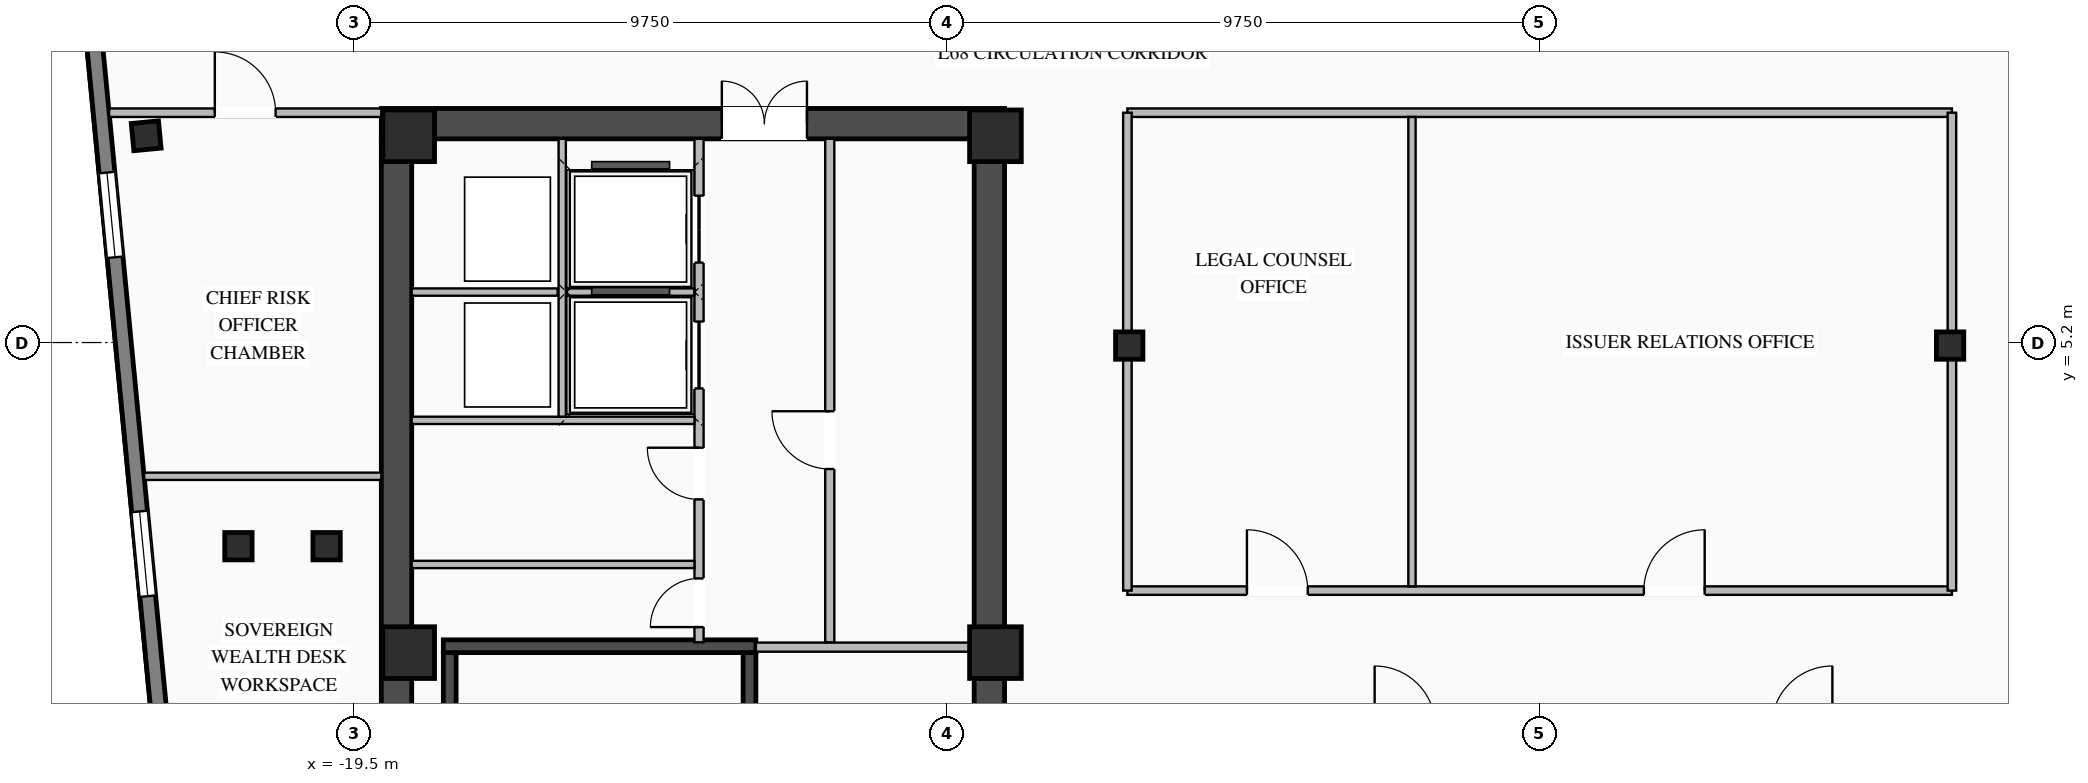
"""IFC4 building model, lengths in metres.
Left out: names, types, materials, properties, quantities, classifications, styles, units other than length and angle.
Written with IfcOpenShell. Run it as: python <this file> out.ifc"""

import sys

from ifc_helpers import new_model, si_unit, direction, frame, frame_2d, origin, origin_2d, place, context, subcontext, project, spatial, rectangle, i_section, extrude, element, fill, save


model = new_model("IFC4")
c1 = context("Model", 3, precision=1e-05, world=origin(), true_north=direction((0.0, 1.0)))
c2 = subcontext(c1, "Body", "Model", "MODEL_VIEW")
j1 = project(units=[si_unit("LENGTHUNIT", "METRE"), si_unit("PLANEANGLEUNIT", "RADIAN")], contexts=[c1])
p1 = place(None, origin())
s1 = spatial("IfcSite", under=j1, at=p1, CompositionType="ELEMENT")
p2 = place(p1, origin())
s2 = spatial("IfcBuilding", under=s1, at=p2, CompositionType="ELEMENT")
p3 = place(p2, frame((0.0, 0.0, 251.7)))
s3 = spatial("IfcBuildingStorey", under=s2, at=p3, CompositionType="ELEMENT", Elevation=251.7)
p4 = place(p3, frame((-19.05, 8.8, 0.0), z_axis=(0.0, 0.0, 1.0), x_axis=(1.0, 0.0, 0.0)))
e1 = element("IfcWall", 1, at=p4, inside=s3, PredefinedType="SHEAR", context=c2, shape_type="SweptSolid", body=[
    extrude(rectangle(XDim=10.25, YDim=0.5, at=frame_2d((5.125, 0.0))), origin(), (0.0, 0.0, 1.0), 3.27),
])
p5 = place(p4, frame((5.6, 0.0, 0.0)))
e2 = element("IfcOpeningElement", 2, at=p5, cuts=e1, PredefinedType="OPENING", context=c2, shape_type="SweptSolid", body=[
    extrude(rectangle(XDim=1.4, YDim=2.05, at=frame_2d((0.7, 1.025))), frame((0.0, 0.26, 0.0), z_axis=(0.0, -1.0, 0.0), x_axis=(1.0, 0.0, 0.0)), (0.0, 0.0, 1.0), 0.52),
])
p6 = place(p3, frame((-18.8, -8.55, 0.0), z_axis=(0.0, 0.0, 1.0), x_axis=(0.0, 1.0, 0.0)))
e3 = element("IfcWall", 3, at=p6, inside=s3, PredefinedType="SHEAR", context=c2, shape_type="SweptSolid", body=[
    extrude(rectangle(XDim=17.1, YDim=0.5, at=frame_2d((8.55, 0.0))), origin(), (0.0, 0.0, 1.0), 3.27),
])
p7 = place(p3, frame((-9.05, -8.55, 0.0), z_axis=(0.0, 0.0, 1.0), x_axis=(0.0, 1.0, 0.0)))
e4 = element("IfcWall", 4, at=p7, inside=s3, PredefinedType="SHEAR", context=c2, shape_type="SweptSolid", body=[
    extrude(rectangle(XDim=17.1, YDim=0.5, at=frame_2d((8.55, 0.0))), origin(), (0.0, 0.0, 1.0), 3.27),
])
p8 = place(p7, frame((5.3, 0.0, 0.0)))
e5 = element("IfcOpeningElement", 5, at=p8, cuts=e4, PredefinedType="OPENING", context=c2, shape_type="SweptSolid", body=[
    extrude(rectangle(XDim=1.1, YDim=2.08, at=frame_2d((0.55, 1.04))), frame((0.0, 0.26, 0.0), z_axis=(0.0, -1.0, 0.0), x_axis=(1.0, 0.0, 0.0)), (0.0, 0.0, 1.0), 0.52),
])
p9 = place(p3, frame((-12.995, -8.1, 0.0), z_axis=(0.0, 0.0, 1.0), x_axis=(0.0, 1.0, 0.0)))
e6 = element("IfcWall", 6, at=p9, inside=s3, PredefinedType="SHEAR", context=c2, shape_type="SweptSolid", body=[
    extrude(rectangle(XDim=8.2, YDim=0.21, at=frame_2d((4.1, 0.0))), origin(), (0.0, 0.0, 1.0), 3.27),
])
p10 = place(p9, frame((6.25, 0.0, 0.0)))
e7 = element("IfcOpeningElement", 7, at=p10, cuts=e6, PredefinedType="OPENING", context=c2, shape_type="SweptSolid", body=[
    extrude(rectangle(XDim=1.1, YDim=2.15, at=frame_2d((0.55, 1.075))), frame((0.0, 0.115, 0.0), z_axis=(0.0, -1.0, 0.0), x_axis=(1.0, 0.0, 0.0)), (0.0, 0.0, 1.0), 0.23),
])
p11 = place(p3, frame((-17.925, -8.1, 0.0), z_axis=(0.0, 0.0, 1.0), x_axis=(0.0, 1.0, 0.0)))
e8 = element("IfcWall", 8, at=p11, inside=s3, PredefinedType="SHEAR", context=c2, shape_type="SweptSolid", body=[
    extrude(rectangle(XDim=8.2, YDim=0.21, at=frame_2d((4.1, 0.0))), origin(), (0.0, 0.0, 1.0), 3.27),
])
p12 = place(p3, frame((-12.89, 0.205, 0.0), z_axis=(0.0, 0.0, 1.0), x_axis=(-1.0, 0.0, 0.0)))
e9 = element("IfcWall", 9, at=p12, inside=s3, PredefinedType="SHEAR", context=c2, shape_type="SweptSolid", body=[
    extrude(rectangle(XDim=5.14, YDim=0.21, at=frame_2d((2.57, 0.0))), origin(), (0.0, 0.0, 1.0), 3.27),
])
for number, where, z_axis, x_axis in (
    (10, (-8.95, 0.1, 0.0), (0.0, 0.0, 1.0), (1.0, 0.0, 0.0)),
    (11, (-8.95, 8.6, 0.0), (0.0, 0.0, 1.0), (1.0, 0.0, 0.0)),
    (12, (-18.6, 0.1, 0.0), (0.0, 0.0, 1.0), (1.0, 0.0, 0.0)),
    (13, (-18.6, 8.6, 0.0), (0.0, 0.0, 1.0), (1.0, 0.0, 0.0)),
):
    element("IfcColumn", number, at=place(p3, frame(where, z_axis=z_axis, x_axis=x_axis)), inside=s3, PredefinedType="COLUMN", context=c2, shape_type="SweptSolid", body=[
        extrude(rectangle(XDim=0.85, YDim=0.85, at=origin_2d()), origin(), (0.0, 0.0, 1.0), 3.45),
    ])
for number, where, z_axis, x_axis in (
    (14, (-6.75, 5.15, 0.0), (0.0, 0.0, 1.0), (1.0, 0.0, 0.0)),
    (15, (6.75, 5.15, 0.0), (0.0, 0.0, 1.0), (1.0, 0.0, 0.0)),
    (16, (-21.4, 1.85, 0.0), (0.0, 0.0, 1.0), (1.0, 0.0, 0.0)),
    (17, (-19.95, 1.85, 0.0), (0.0, 0.0, 1.0), (1.0, 0.0, 0.0)),
    (18, (-22.917, 8.6, 0.0), (0.0, 0.0, 1.0), (0.995, 0.096, 0.0)),
):
    element("IfcColumn", number, at=place(p3, frame(where, z_axis=z_axis, x_axis=x_axis)), inside=s3, PredefinedType="COLUMN", context=c2, shape_type="SweptSolid", body=[
        extrude(i_section(OverallWidth=0.45, OverallDepth=0.45, WebThickness=0.022, FlangeThickness=0.032, at=origin_2d()), origin(), (0.0, 0.0, 1.0), 3.45),
    ])
p13 = place(p3, frame((-22.527, -2.754, 0.0), z_axis=(0.0, 0.0, 1.0), x_axis=(-0.095850890337, 0.995395703638, 0.0)))
e19 = element("IfcWall", 19, at=p13, inside=s3, PredefinedType="STANDARD", context=c2, shape_type="SweptSolid", body=[
    extrude(rectangle(XDim=15.15, YDim=0.26, at=frame_2d((7.575, 0.0))), origin(), (0.0, 0.0, 1.0), 3.25),
])
p14 = place(p13, frame((3.8, 0.0, 0.76)))
e20 = element("IfcOpeningElement", 20, at=p14, cuts=e19, PredefinedType="OPENING", context=c2, shape_type="SweptSolid", body=[
    extrude(rectangle(XDim=1.4, YDim=1.95, at=frame_2d((0.7, 0.975))), frame((0.0, 0.14, 0.0), z_axis=(0.0, -1.0, 0.0), x_axis=(1.0, 0.0, 0.0)), (0.0, 0.0, 1.0), 0.28),
])
p15 = place(p13, frame((9.4, 0.0, 0.76)))
e21 = element("IfcOpeningElement", 21, at=p15, cuts=e19, PredefinedType="OPENING", context=c2, shape_type="SweptSolid", body=[
    extrude(rectangle(XDim=1.4, YDim=1.95, at=frame_2d((0.7, 0.975))), frame((0.0, 0.14, 0.0), z_axis=(0.0, -1.0, 0.0), x_axis=(1.0, 0.0, 0.0)), (0.0, 0.0, 1.0), 0.28),
])
p16 = place(p3, frame((-12.89, 0.19, 0.0), z_axis=(0.0, 0.0, 1.0), x_axis=(1.0, 0.0, 0.0)))
e22 = element("IfcWall", 22, at=p16, inside=s3, PredefinedType="STANDARD", context=c2, shape_type="SweptSolid", body=[
    extrude(rectangle(XDim=3.59, YDim=0.15, at=frame_2d((1.795, 0.0))), origin(), (0.0, 0.0, 1.0), 2.645),
])
p17 = place(p3, frame((-11.675, 0.27, 0.0), z_axis=(0.0, 0.0, 1.0), x_axis=(0.0, 1.0, 0.0)))
e23 = element("IfcWall", 23, at=p17, inside=s3, PredefinedType="STANDARD", context=c2, shape_type="SweptSolid", body=[
    extrude(rectangle(XDim=8.28, YDim=0.15, at=frame_2d((4.14, 0.0))), origin(), (0.0, 0.0, 1.0), 3.25),
])
p18 = place(p17, frame((2.85, 0.0, 0.0)))
e24 = element("IfcOpeningElement", 24, at=p18, cuts=e23, PredefinedType="OPENING", context=c2, shape_type="SweptSolid", body=[
    extrude(rectangle(XDim=0.95, YDim=2.05, at=frame_2d((0.475, 1.025))), frame((0.0, 0.085, 0.0), z_axis=(0.0, -1.0, 0.0), x_axis=(1.0, 0.0, 0.0)), (0.0, 0.0, 1.0), 0.17),
])
p19 = place(p3, frame((-13.825, 0.27, 0.0), z_axis=(0.0, 0.0, 1.0), x_axis=(0.0, 1.0, 0.0)))
e25 = element("IfcWall", 25, at=p19, inside=s3, PredefinedType="STANDARD", context=c2, shape_type="SweptSolid", body=[
    extrude(rectangle(XDim=8.28, YDim=0.15, at=frame_2d((4.14, 0.0))), origin(), (0.0, 0.0, 1.0), 3.25),
])
p20 = place(p19, frame((4.175, 0.0, 0.0)))
e26 = element("IfcOpeningElement", 26, at=p20, cuts=e25, PredefinedType="OPENING", context=c2, shape_type="SweptSolid", body=[
    extrude(rectangle(XDim=1.1, YDim=2.1, at=frame_2d((0.55, 1.05))), frame((0.0, 0.085, 0.0), z_axis=(0.0, -1.0, 0.0), x_axis=(1.0, 0.0, 0.0)), (0.0, 0.0, 1.0), 0.17),
])
p21 = place(p19, frame((6.245, 0.0, 0.0)))
e27 = element("IfcOpeningElement", 27, at=p21, cuts=e25, PredefinedType="OPENING", context=c2, shape_type="SweptSolid", body=[
    extrude(rectangle(XDim=1.1, YDim=2.1, at=frame_2d((0.55, 1.05))), frame((0.0, 0.085, 0.0), z_axis=(0.0, -1.0, 0.0), x_axis=(1.0, 0.0, 0.0)), (0.0, 0.0, 1.0), 0.17),
])
p22 = place(p19, frame((0.25, 0.0, 0.0)))
e28 = element("IfcOpeningElement", 28, at=p22, cuts=e25, PredefinedType="OPENING", context=c2, shape_type="SweptSolid", body=[
    extrude(rectangle(XDim=0.8, YDim=2.05, at=frame_2d((0.4, 1.025))), frame((0.0, 0.085, 0.0), z_axis=(0.0, -1.0, 0.0), x_axis=(1.0, 0.0, 0.0)), (0.0, 0.0, 1.0), 0.17),
])
p23 = place(p19, frame((2.35, 0.0, 0.0)))
e29 = element("IfcOpeningElement", 29, at=p23, cuts=e25, PredefinedType="OPENING", context=c2, shape_type="SweptSolid", body=[
    extrude(rectangle(XDim=0.85, YDim=2.05, at=frame_2d((0.425, 1.025))), frame((0.0, 0.085, 0.0), z_axis=(0.0, -1.0, 0.0), x_axis=(1.0, 0.0, 0.0)), (0.0, 0.0, 1.0), 0.17),
])
p24 = place(p3, frame((-18.55, 3.92, 0.0), z_axis=(0.0, 0.0, 1.0), x_axis=(1.0, 0.0, 0.0)))
e30 = element("IfcWall", 30, at=p24, inside=s3, PredefinedType="STANDARD", context=c2, shape_type="SweptSolid", body=[
    extrude(rectangle(XDim=4.65, YDim=0.12, at=frame_2d((2.325, 0.0))), origin(), (0.0, 0.0, 1.0), 3.25),
])
p25 = place(p3, frame((-18.55, 6.03, 0.0), z_axis=(0.0, 0.0, 1.0), x_axis=(1.0, 0.0, 0.0)))
e31 = element("IfcWall", 31, at=p25, inside=s3, PredefinedType="STANDARD", context=c2, shape_type="SweptSolid", body=[
    extrude(rectangle(XDim=2.4, YDim=0.12, at=frame_2d((1.2, 0.0))), origin(), (0.0, 0.0, 1.0), 3.25),
])
p26 = place(p3, frame((-16.075, 3.98, 0.0), z_axis=(0.0, 0.0, 1.0), x_axis=(0.0, 1.0, 0.0)))
e32 = element("IfcWall", 32, at=p26, inside=s3, PredefinedType="STANDARD", context=c2, shape_type="SweptSolid", body=[
    extrude(rectangle(XDim=4.57, YDim=0.12, at=frame_2d((2.285, 0.0))), origin(), (0.0, 0.0, 1.0), 3.25),
])
p27 = place(p3, frame((-16.0, 6.03, 0.0), z_axis=(0.0, 0.0, 1.0), x_axis=(1.0, 0.0, 0.0)))
e33 = element("IfcWall", 33, at=p27, inside=s3, PredefinedType="STANDARD", context=c2, shape_type="SweptSolid", body=[
    extrude(rectangle(XDim=2.1, YDim=0.12, at=frame_2d((1.05, 0.0))), origin(), (0.0, 0.0, 1.0), 3.25),
])
p28 = place(p3, frame((-18.55, 1.55, 0.0), z_axis=(0.0, 0.0, 1.0), x_axis=(1.0, 0.0, 0.0)))
e34 = element("IfcWall", 34, at=p28, inside=s3, PredefinedType="STANDARD", context=c2, shape_type="SweptSolid", body=[
    extrude(rectangle(XDim=4.65, YDim=0.12, at=frame_2d((2.325, 0.0))), origin(), (0.0, 0.0, 1.0), 3.25),
])
p29 = place(p3, frame((-23.527, 8.98, 0.0), z_axis=(0.0, 0.0, 1.0), x_axis=(1.0, 0.0, 0.0)))
e35 = element("IfcWall", 35, at=p29, inside=s3, PredefinedType="STANDARD", context=c2, shape_type="SweptSolid", body=[
    extrude(rectangle(XDim=4.477, YDim=0.14, at=frame_2d((2.238, 0.0))), origin(), (0.0, 0.0, 1.0), 3.25),
])
p30 = place(p29, frame((1.738, 0.0, 0.0)))
e36 = element("IfcOpeningElement", 36, at=p30, cuts=e35, PredefinedType="OPENING", context=c2, shape_type="SweptSolid", body=[
    extrude(rectangle(XDim=1.0, YDim=2.08, at=frame_2d((0.5, 1.04))), frame((0.0, 0.08, 0.0), z_axis=(0.0, -1.0, 0.0), x_axis=(1.0, 0.0, 0.0)), (0.0, 0.0, 1.0), 0.16),
])
p31 = place(p3, frame((-22.951, 3.0, 0.0), z_axis=(0.0, 0.0, 1.0), x_axis=(1.0, 0.0, 0.0)))
e37 = element("IfcWall", 37, at=p31, inside=s3, PredefinedType="STANDARD", context=c2, shape_type="SweptSolid", body=[
    extrude(rectangle(XDim=3.901, YDim=0.12, at=frame_2d((1.95, 0.0))), origin(), (0.0, 0.0, 1.0), 3.25),
])
p32 = place(p3, frame((-6.78, 1.12, 0.0), z_axis=(0.0, 0.0, 1.0), x_axis=(1.0, 0.0, 0.0)))
e38 = element("IfcWall", 38, at=p32, inside=s3, PredefinedType="STANDARD", context=c2, shape_type="SweptSolid", body=[
    extrude(rectangle(XDim=13.56, YDim=0.14, at=frame_2d((6.78, 0.0))), origin(), (0.0, 0.0, 1.0), 3.25),
])
p33 = place(p32, frame((1.966, 0.0, 0.0)))
e39 = element("IfcOpeningElement", 39, at=p33, cuts=e38, PredefinedType="OPENING", context=c2, shape_type="SweptSolid", body=[
    extrude(rectangle(XDim=1.0, YDim=2.08, at=frame_2d((0.5, 1.04))), frame((0.0, 0.08, 0.0), z_axis=(0.0, -1.0, 0.0), x_axis=(1.0, 0.0, 0.0)), (0.0, 0.0, 1.0), 0.16),
])
p34 = place(p32, frame((8.494, 0.0, 0.0)))
e40 = element("IfcOpeningElement", 40, at=p34, cuts=e38, PredefinedType="OPENING", context=c2, shape_type="SweptSolid", body=[
    extrude(rectangle(XDim=1.0, YDim=2.08, at=frame_2d((0.5, 1.04))), frame((0.0, 0.08, 0.0), z_axis=(0.0, -1.0, 0.0), x_axis=(1.0, 0.0, 0.0)), (0.0, 0.0, 1.0), 0.16),
])
p35 = place(p3, frame((-6.78, 8.98, 0.0), z_axis=(0.0, 0.0, 1.0), x_axis=(1.0, 0.0, 0.0)))
e41 = element("IfcWall", 41, at=p35, inside=s3, PredefinedType="STANDARD", context=c2, shape_type="SweptSolid", body=[
    extrude(rectangle(XDim=13.56, YDim=0.14, at=frame_2d((6.78, 0.0))), origin(), (0.0, 0.0, 1.0), 3.25),
])
for number, where, z_axis, x_axis in (
    (42, (-6.78, 1.12, 0.0), (0.0, 0.0, 1.0), (0.0, 1.0, 0.0)),
    (43, (6.78, 1.12, 0.0), (0.0, 0.0, 1.0), (0.0, 1.0, 0.0)),
):
    element("IfcWall", number, at=place(p3, frame(where, z_axis=z_axis, x_axis=x_axis)), inside=s3, PredefinedType="STANDARD", context=c2, shape_type="SweptSolid", body=[
        extrude(rectangle(XDim=7.86, YDim=0.14, at=frame_2d((3.93, 0.0))), origin(), (0.0, 0.0, 1.0), 2.645),
    ])
p36 = place(p3, frame((-2.1, 1.19, 0.0), z_axis=(0.0, 0.0, 1.0), x_axis=(0.0, 1.0, 0.0)))
e44 = element("IfcWall", 44, at=p36, inside=s3, PredefinedType="STANDARD", context=c2, shape_type="SweptSolid", body=[
    extrude(rectangle(XDim=7.72, YDim=0.12, at=frame_2d((3.86, 0.0))), origin(), (0.0, 0.0, 1.0), 3.25),
])
p37 = place(p14, origin())
e45 = element("IfcWindow", 45, at=p37, inside=s3, PartitioningType="SINGLE_PANEL", PredefinedType="WINDOW", context=c2, shape_type="SweptSolid", body=[
    extrude(rectangle(XDim=1.4, YDim=1.95, at=frame_2d((0.7, 0.975))), frame((0.0, 0.03, 0.0), z_axis=(0.0, -1.0, 0.0), x_axis=(1.0, 0.0, 0.0)), (0.0, 0.0, 1.0), 0.06),
])
fill(e20, e45)
p38 = place(p15, origin())
e46 = element("IfcWindow", 46, at=p38, inside=s3, PartitioningType="SINGLE_PANEL", PredefinedType="WINDOW", context=c2, shape_type="SweptSolid", body=[
    extrude(rectangle(XDim=1.4, YDim=1.95, at=frame_2d((0.7, 0.975))), frame((0.0, 0.03, 0.0), z_axis=(0.0, -1.0, 0.0), x_axis=(1.0, 0.0, 0.0)), (0.0, 0.0, 1.0), 0.06),
])
fill(e21, e46)
p39 = place(p5, origin())
e47 = element("IfcDoor", 47, at=p39, inside=s3, OperationType="DOUBLE_DOOR_SINGLE_SWING", PredefinedType="DOOR", context=c2, shape_type="SweptSolid", body=[
    extrude(rectangle(XDim=1.4, YDim=2.05, at=frame_2d((0.7, 1.025))), frame((0.0, 0.195, 0.0), z_axis=(0.0, -1.0, 0.0), x_axis=(1.0, 0.0, 0.0)), (0.0, 0.0, 1.0), 0.05),
])
fill(e2, e47)
p40 = place(p18, origin())
e48 = element("IfcDoor", 48, at=p40, inside=s3, OperationType="SINGLE_SWING_RIGHT", PredefinedType="DOOR", context=c2, shape_type="SweptSolid", body=[
    extrude(rectangle(XDim=0.95, YDim=2.05, at=frame_2d((0.475, 1.025))), frame((0.0, 0.025, 0.0), z_axis=(0.0, -1.0, 0.0), x_axis=(1.0, 0.0, 0.0)), (0.0, 0.0, 1.0), 0.05),
])
fill(e24, e48)
p41 = place(p20, origin())
e49 = element("IfcDoor", 49, at=p41, inside=s3, OperationType="DOUBLE_DOOR_SLIDING", PredefinedType="DOOR", context=c2, shape_type="SweptSolid", body=[
    extrude(rectangle(XDim=1.1, YDim=2.1, at=frame_2d((0.55, 1.05))), frame((0.0, 0.025, 0.0), z_axis=(0.0, -1.0, 0.0), x_axis=(1.0, 0.0, 0.0)), (0.0, 0.0, 1.0), 0.05),
])
fill(e26, e49)
p42 = place(p21, origin())
e50 = element("IfcDoor", 50, at=p42, inside=s3, OperationType="DOUBLE_DOOR_SLIDING", PredefinedType="DOOR", context=c2, shape_type="SweptSolid", body=[
    extrude(rectangle(XDim=1.1, YDim=2.1, at=frame_2d((0.55, 1.05))), frame((0.0, 0.025, 0.0), z_axis=(0.0, -1.0, 0.0), x_axis=(1.0, 0.0, 0.0)), (0.0, 0.0, 1.0), 0.05),
])
fill(e27, e50)
p43 = place(p22, origin())
e51 = element("IfcDoor", 51, at=p43, inside=s3, OperationType="SINGLE_SWING_LEFT", PredefinedType="DOOR", context=c2, shape_type="SweptSolid", body=[
    extrude(rectangle(XDim=0.8, YDim=2.05, at=frame_2d((0.4, 1.025))), frame((0.0, 0.025, 0.0), z_axis=(0.0, -1.0, 0.0), x_axis=(1.0, 0.0, 0.0)), (0.0, 0.0, 1.0), 0.05),
])
fill(e28, e51)
p44 = place(p23, origin())
e52 = element("IfcDoor", 52, at=p44, inside=s3, OperationType="SINGLE_SWING_RIGHT", PredefinedType="DOOR", context=c2, shape_type="SweptSolid", body=[
    extrude(rectangle(XDim=0.85, YDim=2.05, at=frame_2d((0.425, 1.025))), frame((0.0, 0.025, 0.0), z_axis=(0.0, -1.0, 0.0), x_axis=(1.0, 0.0, 0.0)), (0.0, 0.0, 1.0), 0.05),
])
fill(e29, e52)
p45 = place(p30, origin())
e53 = element("IfcDoor", 53, at=p45, inside=s3, OperationType="SINGLE_SWING_LEFT", PredefinedType="DOOR", context=c2, shape_type="SweptSolid", body=[
    extrude(rectangle(XDim=1.0, YDim=2.08, at=frame_2d((0.5, 1.04))), frame((0.0, 0.025, 0.0), z_axis=(0.0, -1.0, 0.0), x_axis=(1.0, 0.0, 0.0)), (0.0, 0.0, 1.0), 0.05),
])
fill(e36, e53)
p46 = place(p33, origin())
e54 = element("IfcDoor", 54, at=p46, inside=s3, OperationType="SINGLE_SWING_LEFT", PredefinedType="DOOR", context=c2, shape_type="SweptSolid", body=[
    extrude(rectangle(XDim=1.0, YDim=2.08, at=frame_2d((0.5, 1.04))), frame((0.0, 0.025, 0.0), z_axis=(0.0, -1.0, 0.0), x_axis=(1.0, 0.0, 0.0)), (0.0, 0.0, 1.0), 0.05),
])
fill(e39, e54)
p47 = place(p34, origin())
e55 = element("IfcDoor", 55, at=p47, inside=s3, OperationType="SINGLE_SWING_RIGHT", PredefinedType="DOOR", context=c2, shape_type="SweptSolid", body=[
    extrude(rectangle(XDim=1.0, YDim=2.08, at=frame_2d((0.5, 1.04))), frame((0.0, 0.025, 0.0), z_axis=(0.0, -1.0, 0.0), x_axis=(1.0, 0.0, 0.0)), (0.0, 0.0, 1.0), 0.05),
])
fill(e40, e55)
save(model, sys.argv[1])
